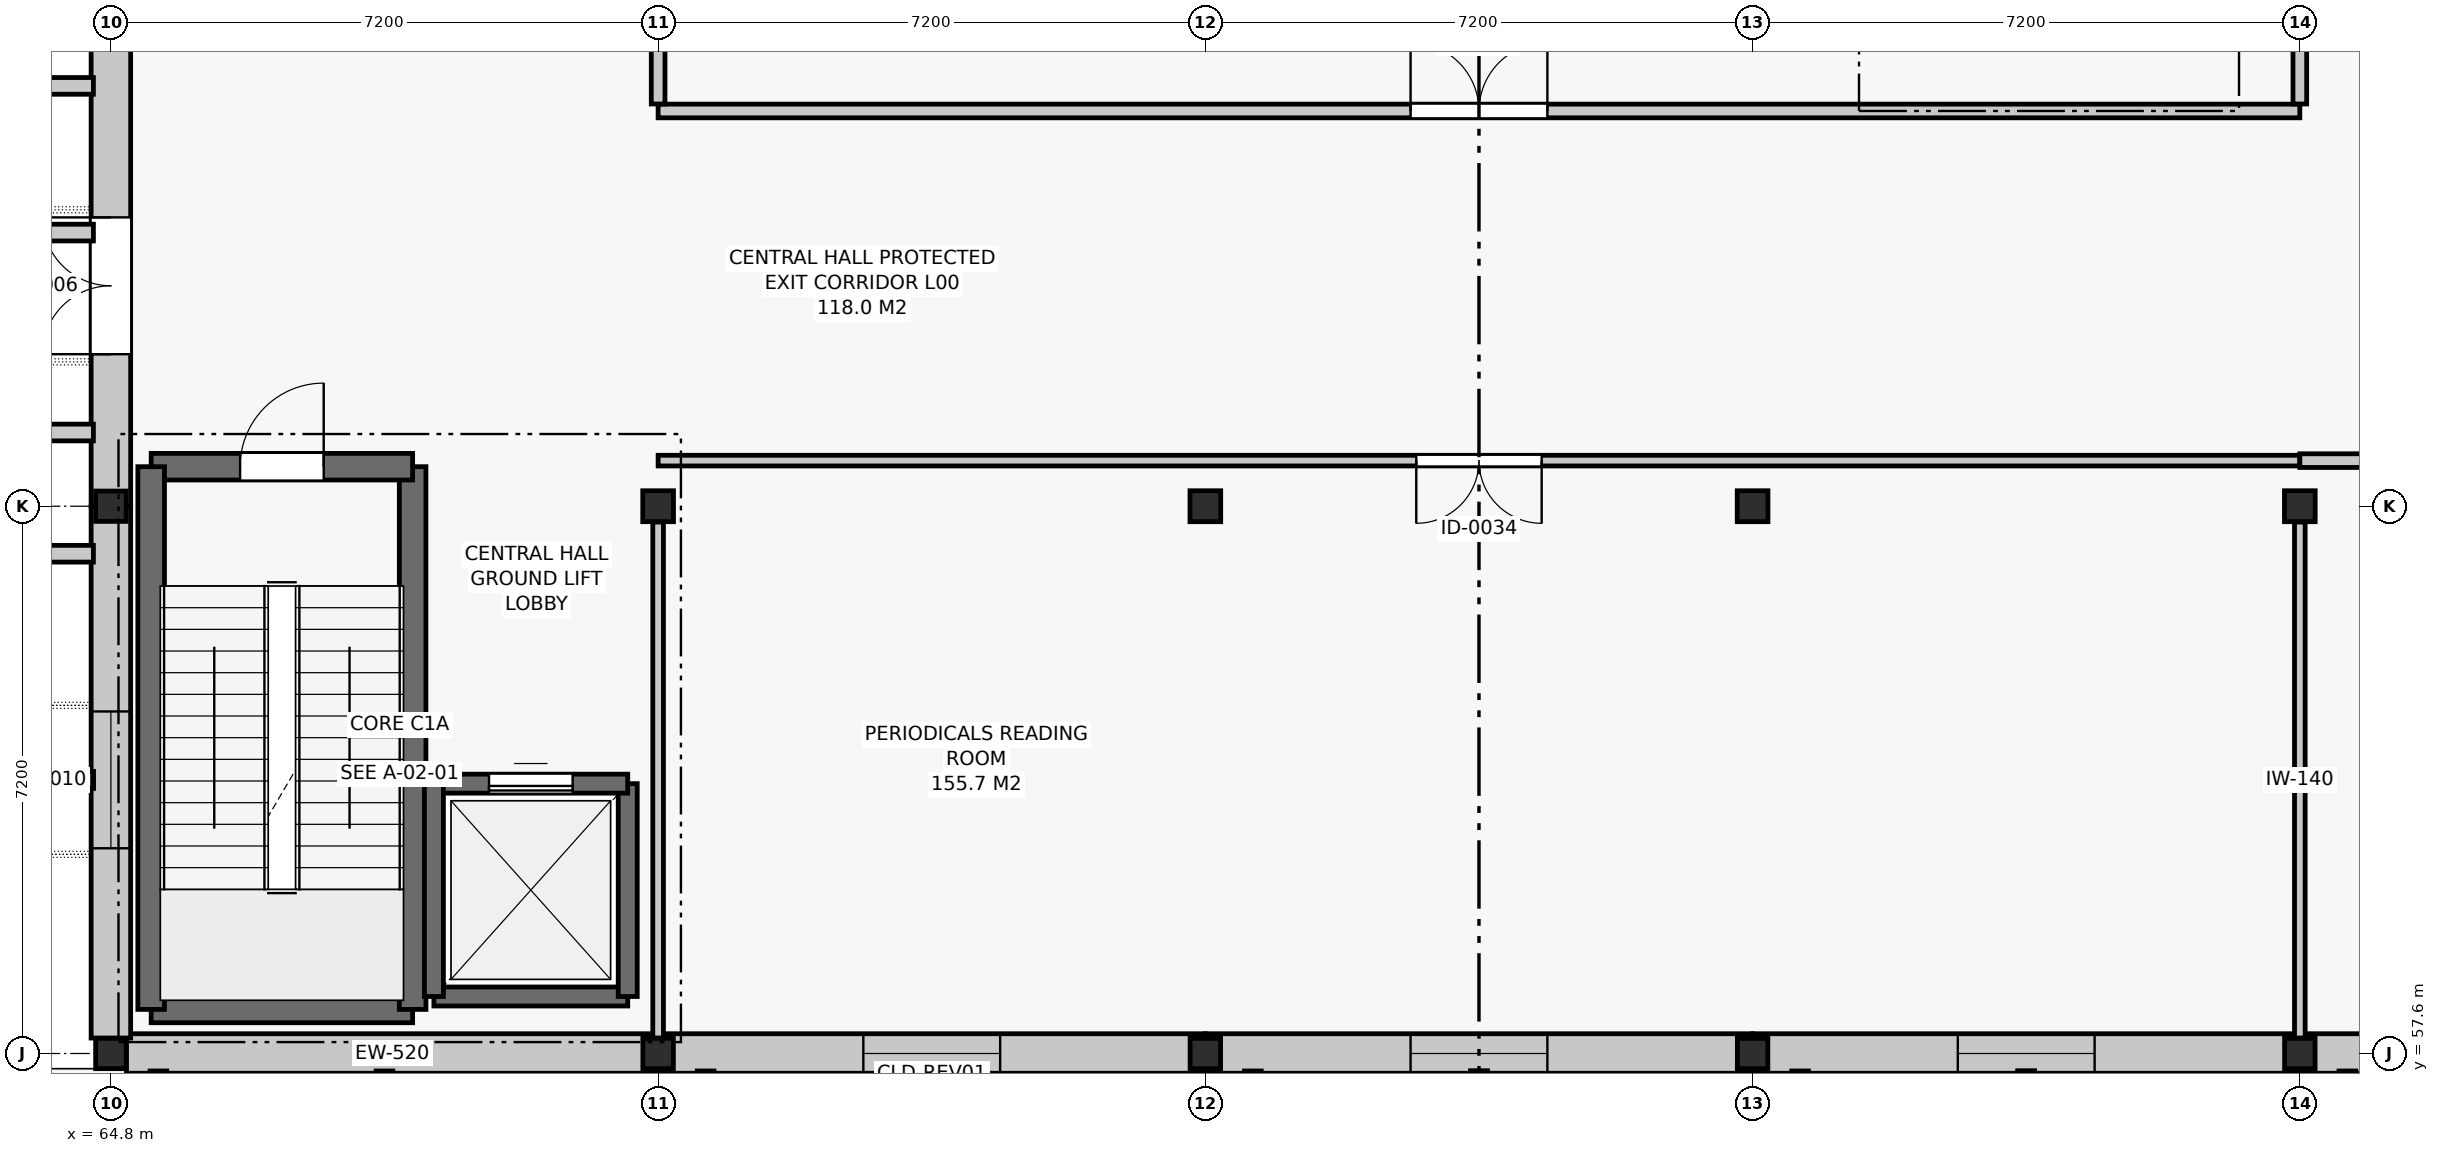
"""IFC4 building model, lengths in metres.
Left out: names, types, materials, properties, quantities, classifications, styles, units other than length and angle.
Written with IfcOpenShell. Run it as: python <this file> out.ifc"""

import sys

from ifc_helpers import new_model, si_unit, direction, frame, frame_2d, origin, origin_2d, place, context, subcontext, project, spatial, rectangle, i_section, extrude, element, fill, save


model = new_model("IFC4")
c1 = context("Model", 3, precision=1e-05, world=origin(), true_north=direction((0.0, 1.0)))
c2 = subcontext(c1, "Body", "Model", "MODEL_VIEW")
j1 = project(units=[si_unit("LENGTHUNIT", "METRE"), si_unit("PLANEANGLEUNIT", "RADIAN")], contexts=[c1])
p1 = place(None, origin())
s1 = spatial("IfcSite", under=j1, at=p1, CompositionType="ELEMENT")
p2 = place(p1, origin())
s2 = spatial("IfcBuilding", under=s1, at=p2, CompositionType="ELEMENT")
p3 = place(p2, origin())
s3 = spatial("IfcBuildingStorey", under=s2, at=p3, CompositionType="ELEMENT", Elevation=0.0)
for number, where, z_axis, x_axis in (
    (1, (64.8, 57.6, 0.0), (0.0, 0.0, 1.0), (1.0, 0.0, 0.0)),
    (2, (64.8, 64.8, 0.0), (0.0, 0.0, 1.0), (1.0, 0.0, 0.0)),
    (3, (72.0, 57.6, 0.0), (0.0, 0.0, 1.0), (1.0, 0.0, 0.0)),
):
    element("IfcColumn", number, at=place(p3, frame(where, z_axis=z_axis, x_axis=x_axis)), inside=s3, PredefinedType="COLUMN", context=c2, shape_type="SweptSolid", body=[
        extrude(i_section(OverallWidth=0.401, OverallDepth=0.399, WebThickness=0.019, FlangeThickness=0.029, FilletRadius=0.015, at=origin_2d()), origin(), (0.0, 0.0, 1.0), 5.4),
    ])
p4 = place(p3, frame((72.0, 64.8, 0.0), z_axis=(0.0, 0.0, 1.0), x_axis=(1.0, 0.0, 0.0)))
e4 = element("IfcColumn", 4, at=p4, inside=s3, PredefinedType="COLUMN", context=c2, shape_type="SweptSolid", body=[
    extrude(i_section(OverallWidth=0.404, OverallDepth=0.407, WebThickness=0.02, FlangeThickness=0.032, FilletRadius=0.015, at=origin_2d()), origin(), (0.0, 0.0, 1.0), 5.4),
])
p5 = place(p3, frame((79.2, 57.6, 0.0), z_axis=(0.0, 0.0, 1.0), x_axis=(1.0, 0.0, 0.0)))
e5 = element("IfcColumn", 5, at=p5, inside=s3, PredefinedType="COLUMN", context=c2, shape_type="SweptSolid", body=[
    extrude(i_section(OverallWidth=0.401, OverallDepth=0.399, WebThickness=0.019, FlangeThickness=0.029, FilletRadius=0.015, at=origin_2d()), origin(), (0.0, 0.0, 1.0), 5.4),
])
p6 = place(p3, frame((79.2, 64.8, 0.0), z_axis=(0.0, 0.0, 1.0), x_axis=(1.0, 0.0, 0.0)))
e6 = element("IfcColumn", 6, at=p6, inside=s3, PredefinedType="COLUMN", context=c2, shape_type="SweptSolid", body=[
    extrude(i_section(OverallWidth=0.404, OverallDepth=0.407, WebThickness=0.02, FlangeThickness=0.032, FilletRadius=0.015, at=origin_2d()), origin(), (0.0, 0.0, 1.0), 5.4),
])
p7 = place(p3, frame((86.4, 57.6, 0.0), z_axis=(0.0, 0.0, 1.0), x_axis=(1.0, 0.0, 0.0)))
e7 = element("IfcColumn", 7, at=p7, inside=s3, PredefinedType="COLUMN", context=c2, shape_type="SweptSolid", body=[
    extrude(i_section(OverallWidth=0.401, OverallDepth=0.399, WebThickness=0.019, FlangeThickness=0.029, FilletRadius=0.015, at=origin_2d()), origin(), (0.0, 0.0, 1.0), 5.4),
])
p8 = place(p3, frame((86.4, 64.8, 0.0), z_axis=(0.0, 0.0, 1.0), x_axis=(1.0, 0.0, 0.0)))
e8 = element("IfcColumn", 8, at=p8, inside=s3, PredefinedType="COLUMN", context=c2, shape_type="SweptSolid", body=[
    extrude(i_section(OverallWidth=0.404, OverallDepth=0.407, WebThickness=0.02, FlangeThickness=0.032, FilletRadius=0.015, at=origin_2d()), origin(), (0.0, 0.0, 1.0), 5.4),
])
p9 = place(p3, frame((93.6, 57.6, 0.0), z_axis=(0.0, 0.0, 1.0), x_axis=(1.0, 0.0, 0.0)))
e9 = element("IfcColumn", 9, at=p9, inside=s3, PredefinedType="COLUMN", context=c2, shape_type="SweptSolid", body=[
    extrude(i_section(OverallWidth=0.401, OverallDepth=0.399, WebThickness=0.019, FlangeThickness=0.029, FilletRadius=0.015, at=origin_2d()), origin(), (0.0, 0.0, 1.0), 5.4),
])
p10 = place(p3, frame((93.6, 64.8, 0.0), z_axis=(0.0, 0.0, 1.0), x_axis=(1.0, 0.0, 0.0)))
e10 = element("IfcColumn", 10, at=p10, inside=s3, PredefinedType="COLUMN", context=c2, shape_type="SweptSolid", body=[
    extrude(i_section(OverallWidth=0.404, OverallDepth=0.407, WebThickness=0.02, FlangeThickness=0.032, FilletRadius=0.015, at=origin_2d()), origin(), (0.0, 0.0, 1.0), 5.4),
])
p11 = place(p3, frame((65.004, 57.6, 0.0), z_axis=(0.0, 0.0, 1.0), x_axis=(1.0, 0.0, 0.0)))
e11 = element("IfcWall", 11, at=p11, inside=s3, PredefinedType="SOLIDWALL", context=c2, shape_type="SweptSolid", body=[
    extrude(rectangle(XDim=6.996, YDim=0.52, at=frame_2d((3.498, 0.0))), origin(), (0.0, 0.0, 1.0), 4.4),
])
p12 = place(p3, frame((72.0, 57.6, 0.0), z_axis=(0.0, 0.0, 1.0), x_axis=(1.0, 0.0, 0.0)))
e12 = element("IfcWall", 12, at=p12, inside=s3, PredefinedType="SOLIDWALL", context=c2, shape_type="SweptSolid", body=[
    extrude(rectangle(XDim=7.2, YDim=0.52, at=frame_2d((3.6, 0.0))), origin(), (0.0, 0.0, 1.0), 4.4),
])
p13 = place(p12, frame((2.7, 0.0, 0.9)))
e13 = element("IfcOpeningElement", 13, at=p13, cuts=e12, PredefinedType="OPENING", context=c2, shape_type="SweptSolid", body=[
    extrude(rectangle(XDim=1.8, YDim=2.45, at=frame_2d((0.9, 1.225))), frame((0.0, 0.272, 0.0), z_axis=(0.0, -1.0, 0.0), x_axis=(1.0, 0.0, 0.0)), (0.0, 0.0, 1.0), 0.544),
])
p14 = place(p3, frame((79.2, 57.6, 0.0), z_axis=(0.0, 0.0, 1.0), x_axis=(1.0, 0.0, 0.0)))
e14 = element("IfcWall", 14, at=p14, inside=s3, PredefinedType="SOLIDWALL", context=c2, shape_type="SweptSolid", body=[
    extrude(rectangle(XDim=7.2, YDim=0.52, at=frame_2d((3.6, 0.0))), origin(), (0.0, 0.0, 1.0), 4.4),
])
p15 = place(p14, frame((2.7, 0.0, 0.9)))
e15 = element("IfcOpeningElement", 15, at=p15, cuts=e14, PredefinedType="OPENING", context=c2, shape_type="SweptSolid", body=[
    extrude(rectangle(XDim=1.8, YDim=2.45, at=frame_2d((0.9, 1.225))), frame((0.0, 0.272, 0.0), z_axis=(0.0, -1.0, 0.0), x_axis=(1.0, 0.0, 0.0)), (0.0, 0.0, 1.0), 0.544),
])
p16 = place(p3, frame((86.4, 57.6, 0.0), z_axis=(0.0, 0.0, 1.0), x_axis=(1.0, 0.0, 0.0)))
e16 = element("IfcWall", 16, at=p16, inside=s3, PredefinedType="SOLIDWALL", context=c2, shape_type="SweptSolid", body=[
    extrude(rectangle(XDim=7.2, YDim=0.52, at=frame_2d((3.6, 0.0))), origin(), (0.0, 0.0, 1.0), 4.4),
])
p17 = place(p16, frame((2.7, 0.0, 0.9)))
e17 = element("IfcOpeningElement", 17, at=p17, cuts=e16, PredefinedType="OPENING", context=c2, shape_type="SweptSolid", body=[
    extrude(rectangle(XDim=1.8, YDim=2.45, at=frame_2d((0.9, 1.225))), frame((0.0, 0.272, 0.0), z_axis=(0.0, -1.0, 0.0), x_axis=(1.0, 0.0, 0.0)), (0.0, 0.0, 1.0), 0.544),
])
p18 = place(p3, frame((93.6, 57.6, 0.0), z_axis=(0.0, 0.0, 1.0), x_axis=(1.0, 0.0, 0.0)))
e18 = element("IfcWall", 18, at=p18, inside=s3, PredefinedType="SOLIDWALL", context=c2, shape_type="SweptSolid", body=[
    extrude(rectangle(XDim=6.995, YDim=0.52, at=frame_2d((3.498, 0.0))), origin(), (0.0, 0.0, 1.0), 4.4),
])
p19 = place(p18, frame((2.7, 0.0, 0.9)))
e19 = element("IfcOpeningElement", 19, at=p19, cuts=e18, PredefinedType="OPENING", context=c2, shape_type="SweptSolid", body=[
    extrude(rectangle(XDim=1.8, YDim=2.45, at=frame_2d((0.9, 1.225))), frame((0.0, 0.272, 0.0), z_axis=(0.0, -1.0, 0.0), x_axis=(1.0, 0.0, 0.0)), (0.0, 0.0, 1.0), 0.544),
])
p20 = place(p3, frame((64.8, 72.0, 0.0), z_axis=(0.0, 0.0, 1.0), x_axis=(0.0, -1.0, 0.0)))
e20 = element("IfcWall", 20, at=p20, inside=s3, PredefinedType="SOLIDWALL", context=c2, shape_type="SweptSolid", body=[
    extrude(rectangle(XDim=7.2, YDim=0.52, at=frame_2d((3.6, 0.0))), origin(), (0.0, 0.0, 1.0), 4.4),
])
p21 = place(p20, frame((3.4, 0.0, 0.0)))
e21 = element("IfcOpeningElement", 21, at=p21, cuts=e20, PredefinedType="OPENING", context=c2, shape_type="SweptSolid", body=[
    extrude(rectangle(XDim=1.8, YDim=2.2, at=frame_2d((0.9, 1.1))), frame((0.0, 0.272, 0.0), z_axis=(0.0, -1.0, 0.0), x_axis=(1.0, 0.0, 0.0)), (0.0, 0.0, 1.0), 0.544),
])
p22 = place(p3, frame((64.8, 64.8, 0.0), z_axis=(0.0, 0.0, 1.0), x_axis=(0.0, -1.0, 0.0)))
e22 = element("IfcWall", 22, at=p22, inside=s3, PredefinedType="SOLIDWALL", context=c2, shape_type="SweptSolid", body=[
    extrude(rectangle(XDim=6.997, YDim=0.52, at=frame_2d((3.498, 0.0))), origin(), (0.0, 0.0, 1.0), 4.4),
])
p23 = place(p22, frame((2.7, 0.0, 0.9)))
e23 = element("IfcOpeningElement", 23, at=p23, cuts=e22, PredefinedType="OPENING", context=c2, shape_type="SweptSolid", body=[
    extrude(rectangle(XDim=1.8, YDim=2.45, at=frame_2d((0.9, 1.225))), frame((0.0, 0.272, 0.0), z_axis=(0.0, -1.0, 0.0), x_axis=(1.0, 0.0, 0.0)), (0.0, 0.0, 1.0), 0.544),
])
p24 = place(p3, frame((65.33, 58.18, 0.0), z_axis=(0.0, 0.0, 1.0), x_axis=(1.0, 0.0, 0.0)))
e24 = element("IfcWall", 24, at=p24, inside=s3, PredefinedType="SHEAR", context=c2, shape_type="SweptSolid", body=[
    extrude(rectangle(XDim=3.44, YDim=0.35, at=frame_2d((1.72, 0.0))), origin(), (0.0, 0.0, 1.0), 5.12),
])
p25 = place(p3, frame((68.77, 58.18, 0.0), z_axis=(0.0, 0.0, 1.0), x_axis=(0.0, 1.0, 0.0)))
e25 = element("IfcWall", 25, at=p25, inside=s3, PredefinedType="SHEAR", context=c2, shape_type="SweptSolid", body=[
    extrude(rectangle(XDim=7.14, YDim=0.35, at=frame_2d((3.57, 0.0))), origin(), (0.0, 0.0, 1.0), 5.12),
])
p26 = place(p3, frame((68.77, 65.32, 0.0), z_axis=(0.0, 0.0, 1.0), x_axis=(-1.0, 0.0, 0.0)))
e26 = element("IfcWall", 26, at=p26, inside=s3, PredefinedType="SHEAR", context=c2, shape_type="SweptSolid", body=[
    extrude(rectangle(XDim=3.44, YDim=0.35, at=frame_2d((1.72, 0.0))), origin(), (0.0, 0.0, 1.0), 5.12),
])
p27 = place(p26, frame((1.17, 0.0, 0.0)))
e27 = element("IfcOpeningElement", 27, at=p27, cuts=e26, PredefinedType="OPENING", context=c2, shape_type="SweptSolid", body=[
    extrude(rectangle(XDim=1.1, YDim=2.15, at=frame_2d((0.55, 1.075))), frame((0.0, 0.187, 0.0), z_axis=(0.0, -1.0, 0.0), x_axis=(1.0, 0.0, 0.0)), (0.0, 0.0, 1.0), 0.374),
])
p28 = place(p3, frame((65.33, 65.32, 0.0), z_axis=(0.0, 0.0, 1.0), x_axis=(0.0, -1.0, 0.0)))
e28 = element("IfcWall", 28, at=p28, inside=s3, PredefinedType="SHEAR", context=c2, shape_type="SweptSolid", body=[
    extrude(rectangle(XDim=7.14, YDim=0.35, at=frame_2d((3.57, 0.0))), origin(), (0.0, 0.0, 1.0), 5.12),
])
p29 = place(p3, frame((69.05, 58.35, 0.0), z_axis=(0.0, 0.0, 1.0), x_axis=(1.0, 0.0, 0.0)))
e29 = element("IfcWall", 29, at=p29, inside=s3, PredefinedType="SHEAR", context=c2, shape_type="SweptSolid", body=[
    extrude(rectangle(XDim=2.55, YDim=0.25, at=frame_2d((1.275, 0.0))), origin(), (0.0, 0.0, 1.0), 5.12),
])
p30 = place(p3, frame((71.6, 58.35, 0.0), z_axis=(0.0, 0.0, 1.0), x_axis=(0.0, 1.0, 0.0)))
e30 = element("IfcWall", 30, at=p30, inside=s3, PredefinedType="SHEAR", context=c2, shape_type="SweptSolid", body=[
    extrude(rectangle(XDim=2.8, YDim=0.25, at=frame_2d((1.4, 0.0))), origin(), (0.0, 0.0, 1.0), 5.12),
])
p31 = place(p3, frame((71.6, 61.15, 0.0), z_axis=(0.0, 0.0, 1.0), x_axis=(-1.0, 0.0, 0.0)))
e31 = element("IfcWall", 31, at=p31, inside=s3, PredefinedType="SHEAR", context=c2, shape_type="SweptSolid", body=[
    extrude(rectangle(XDim=2.55, YDim=0.25, at=frame_2d((1.275, 0.0))), origin(), (0.0, 0.0, 1.0), 5.12),
])
p32 = place(p31, frame((0.725, 0.0, 0.0)))
e32 = element("IfcOpeningElement", 32, at=p32, cuts=e31, PredefinedType="OPENING", context=c2, shape_type="SweptSolid", body=[
    extrude(rectangle(XDim=1.1, YDim=2.1, at=frame_2d((0.55, 1.05))), frame((0.0, 0.137, 0.0), z_axis=(0.0, -1.0, 0.0), x_axis=(1.0, 0.0, 0.0)), (0.0, 0.0, 1.0), 0.274),
])
p33 = place(p3, frame((69.05, 61.15, 0.0), z_axis=(0.0, 0.0, 1.0), x_axis=(0.0, -1.0, 0.0)))
e33 = element("IfcWall", 33, at=p33, inside=s3, PredefinedType="SHEAR", context=c2, shape_type="SweptSolid", body=[
    extrude(rectangle(XDim=2.8, YDim=0.25, at=frame_2d((1.4, 0.0))), origin(), (0.0, 0.0, 1.0), 5.12),
])
p34 = place(p3, frame((72.0, 65.4, 0.0), z_axis=(0.0, 0.0, 1.0), x_axis=(1.0, 0.0, 0.0)))
e34 = element("IfcWall", 34, at=p34, inside=s3, PredefinedType="PARTITIONING", context=c2, shape_type="SweptSolid", body=[
    extrude(rectangle(XDim=21.6, YDim=0.14, at=frame_2d((10.8, 0.0))), origin(), (0.0, 0.0, 1.0), 4.665),
])
p35 = place(p34, frame((9.975, 0.0, 0.0)))
e35 = element("IfcOpeningElement", 35, at=p35, cuts=e34, PredefinedType="OPENING", context=c2, shape_type="SweptSolid", body=[
    extrude(rectangle(XDim=1.65, YDim=2.25, at=frame_2d((0.825, 1.125))), frame((0.0, 0.082, 0.0), z_axis=(0.0, -1.0, 0.0), x_axis=(1.0, 0.0, 0.0)), (0.0, 0.0, 1.0), 0.164),
])
p36 = place(p3, frame((72.0, 70.0, 0.0), z_axis=(0.0, 0.0, 1.0), x_axis=(1.0, 0.0, 0.0)))
e36 = element("IfcWall", 36, at=p36, inside=s3, PredefinedType="PARTITIONING", context=c2, shape_type="SweptSolid", body=[
    extrude(rectangle(XDim=21.6, YDim=0.18, at=frame_2d((10.8, 0.0))), origin(), (0.0, 0.0, 1.0), 4.665),
])
p37 = place(p36, frame((9.9, 0.0, 0.0)))
e37 = element("IfcOpeningElement", 37, at=p37, cuts=e36, PredefinedType="OPENING", context=c2, shape_type="SweptSolid", body=[
    extrude(rectangle(XDim=1.8, YDim=2.35, at=frame_2d((0.9, 1.175))), frame((0.0, 0.102, 0.0), z_axis=(0.0, -1.0, 0.0), x_axis=(1.0, 0.0, 0.0)), (0.0, 0.0, 1.0), 0.204),
])
p38 = place(p3, frame((93.6, 65.4, 0.0), z_axis=(0.0, 0.0, 1.0), x_axis=(1.0, 0.0, 0.0)))
e38 = element("IfcWall", 38, at=p38, inside=s3, PredefinedType="PARTITIONING", context=c2, shape_type="SweptSolid", body=[
    extrude(rectangle(XDim=7.145, YDim=0.18, at=frame_2d((3.573, 0.0))), origin(), (0.0, 0.0, 1.0), 4.555),
])
p39 = place(p38, frame((2.873, 0.0, 0.0)))
e39 = element("IfcOpeningElement", 39, at=p39, cuts=e38, PredefinedType="OPENING", context=c2, shape_type="SweptSolid", body=[
    extrude(rectangle(XDim=1.4, YDim=2.2, at=frame_2d((0.7, 1.1))), frame((0.0, 0.102, 0.0), z_axis=(0.0, -1.0, 0.0), x_axis=(1.0, 0.0, 0.0)), (0.0, 0.0, 1.0), 0.204),
])
for number, where, z_axis, x_axis in (
    (40, (72.0, 57.803, 0.0), (0.0, 0.0, 1.0), (0.0, 1.0, 0.0)),
    (41, (93.6, 57.803, 0.0), (0.0, 0.0, 1.0), (0.0, 1.0, 0.0)),
):
    element("IfcWall", number, at=place(p3, frame(where, z_axis=z_axis, x_axis=x_axis)), inside=s3, PredefinedType="PARTITIONING", context=c2, shape_type="SweptSolid", body=[
        extrude(rectangle(XDim=6.789, YDim=0.14, at=frame_2d((3.395, 0.0))), origin(), (0.0, 0.0, 1.0), 4.665),
    ])
for number, where, z_axis, x_axis in (
    (42, (72.0, 70.092, 0.0), (0.0, 0.0, 1.0), (0.0, 1.0, 0.0)),
    (43, (93.6, 70.092, 0.0), (0.0, 0.0, 1.0), (0.0, 1.0, 0.0)),
):
    element("IfcWall", number, at=place(p3, frame(where, z_axis=z_axis, x_axis=x_axis)), inside=s3, PredefinedType="PARTITIONING", context=c2, shape_type="SweptSolid", body=[
        extrude(rectangle(XDim=1.7, YDim=0.18, at=frame_2d((0.85, 0.0))), origin(), (0.0, 0.0, 1.0), 4.665),
    ])
p40 = place(p13, origin())
e44 = element("IfcWindow", 44, at=p40, inside=s3, PartitioningType="SINGLE_PANEL", PredefinedType="WINDOW", context=c2, shape_type="SweptSolid", body=[
    extrude(rectangle(XDim=1.8, YDim=2.45, at=frame_2d((0.9, 1.225))), frame((0.0, 0.03, 0.0), z_axis=(0.0, -1.0, 0.0), x_axis=(1.0, 0.0, 0.0)), (0.0, 0.0, 1.0), 0.06),
])
fill(e13, e44)
p41 = place(p15, origin())
e45 = element("IfcWindow", 45, at=p41, inside=s3, PartitioningType="SINGLE_PANEL", PredefinedType="WINDOW", context=c2, shape_type="SweptSolid", body=[
    extrude(rectangle(XDim=1.8, YDim=2.45, at=frame_2d((0.9, 1.225))), frame((0.0, 0.03, 0.0), z_axis=(0.0, -1.0, 0.0), x_axis=(1.0, 0.0, 0.0)), (0.0, 0.0, 1.0), 0.06),
])
fill(e15, e45)
p42 = place(p17, origin())
e46 = element("IfcWindow", 46, at=p42, inside=s3, PartitioningType="SINGLE_PANEL", PredefinedType="WINDOW", context=c2, shape_type="SweptSolid", body=[
    extrude(rectangle(XDim=1.8, YDim=2.45, at=frame_2d((0.9, 1.225))), frame((0.0, 0.03, 0.0), z_axis=(0.0, -1.0, 0.0), x_axis=(1.0, 0.0, 0.0)), (0.0, 0.0, 1.0), 0.06),
])
fill(e17, e46)
p43 = place(p21, frame((1.8, 0.0, 0.0), z_axis=(0.0, 0.0, 1.0), x_axis=(-1.0, 0.0, 0.0)))
e47 = element("IfcDoor", 47, at=p43, inside=s3, OperationType="DOUBLE_DOOR_SINGLE_SWING", PredefinedType="DOOR", context=c2, shape_type="SweptSolid", body=[
    extrude(rectangle(XDim=1.8, YDim=2.2, at=frame_2d((0.9, 1.1))), frame((0.0, 0.025, 0.0), z_axis=(0.0, -1.0, 0.0), x_axis=(1.0, 0.0, 0.0)), (0.0, 0.0, 1.0), 0.05),
])
fill(e21, e47)
p44 = place(p23, origin())
e48 = element("IfcWindow", 48, at=p44, inside=s3, PartitioningType="SINGLE_PANEL", PredefinedType="WINDOW", context=c2, shape_type="SweptSolid", body=[
    extrude(rectangle(XDim=1.8, YDim=2.45, at=frame_2d((0.9, 1.225))), frame((0.0, 0.03, 0.0), z_axis=(0.0, -1.0, 0.0), x_axis=(1.0, 0.0, 0.0)), (0.0, 0.0, 1.0), 0.06),
])
fill(e23, e48)
p45 = place(p27, frame((1.1, 0.0, 0.0), z_axis=(0.0, 0.0, 1.0), x_axis=(-1.0, 0.0, 0.0)))
e49 = element("IfcDoor", 49, at=p45, inside=s3, OperationType="SINGLE_SWING_RIGHT", PredefinedType="DOOR", context=c2, shape_type="SweptSolid", body=[
    extrude(rectangle(XDim=1.1, YDim=2.15, at=frame_2d((0.55, 1.075))), frame((0.0, 0.025, 0.0), z_axis=(0.0, -1.0, 0.0), x_axis=(1.0, 0.0, 0.0)), (0.0, 0.0, 1.0), 0.05),
])
fill(e27, e49)
p46 = place(p32, origin())
e50 = element("IfcDoor", 50, at=p46, inside=s3, OperationType="SLIDING_TO_LEFT", PredefinedType="DOOR", context=c2, shape_type="SweptSolid", body=[
    extrude(rectangle(XDim=1.1, YDim=2.1, at=frame_2d((0.55, 1.05))), frame((0.0, 0.025, 0.0), z_axis=(0.0, -1.0, 0.0), x_axis=(1.0, 0.0, 0.0)), (0.0, 0.0, 1.0), 0.05),
])
fill(e32, e50)
p47 = place(p35, frame((1.65, 0.0, 0.0), z_axis=(0.0, 0.0, 1.0), x_axis=(-1.0, 0.0, 0.0)))
e51 = element("IfcDoor", 51, at=p47, inside=s3, OperationType="DOUBLE_DOOR_SINGLE_SWING", PredefinedType="DOOR", context=c2, shape_type="SweptSolid", body=[
    extrude(rectangle(XDim=1.65, YDim=2.25, at=frame_2d((0.825, 1.125))), frame((0.0, 0.025, 0.0), z_axis=(0.0, -1.0, 0.0), x_axis=(1.0, 0.0, 0.0)), (0.0, 0.0, 1.0), 0.05),
])
fill(e35, e51)
p48 = place(p37, origin())
e52 = element("IfcDoor", 52, at=p48, inside=s3, OperationType="DOUBLE_DOOR_SINGLE_SWING", PredefinedType="DOOR", context=c2, shape_type="SweptSolid", body=[
    extrude(rectangle(XDim=1.8, YDim=2.35, at=frame_2d((0.9, 1.175))), frame((0.0, 0.025, 0.0), z_axis=(0.0, -1.0, 0.0), x_axis=(1.0, 0.0, 0.0)), (0.0, 0.0, 1.0), 0.05),
])
fill(e37, e52)
save(model, sys.argv[1])
